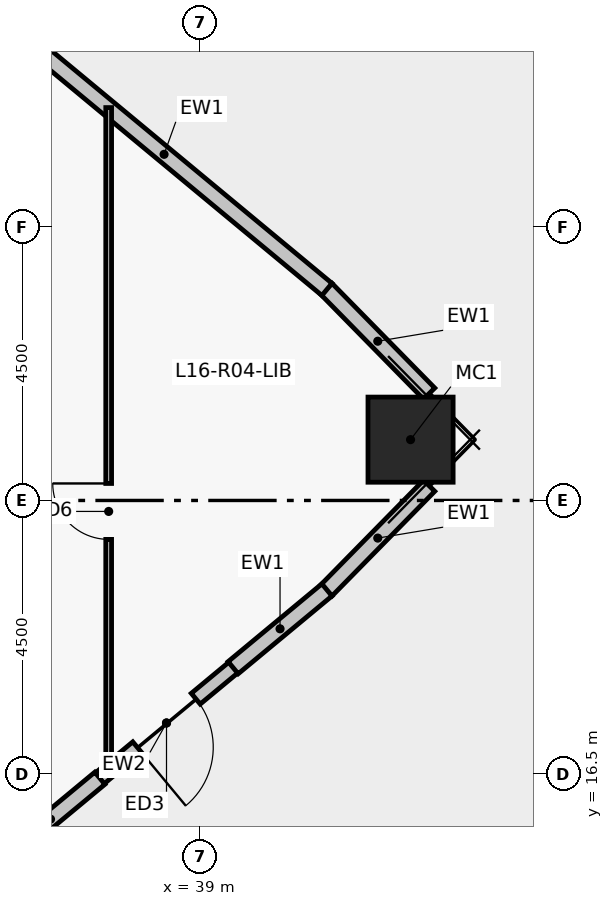
"""IFC4 building model, lengths in metres.
Left out: names, types, materials, properties, quantities, classifications, styles, units other than length and angle.
Written with IfcOpenShell. Run it as: python <this file> out.ifc"""

import sys

from ifc_helpers import new_model, si_unit, direction, frame, frame_2d, origin, origin_2d, place, context, subcontext, project, spatial, rectangle, hollow_rectangle, extrude, element, fill, save


model = new_model("IFC4")
c1 = context("Model", 3, precision=1e-05, world=origin(), true_north=direction((0.0, 1.0)))
c2 = subcontext(c1, "Body", "Model", "MODEL_VIEW")
j1 = project(units=[si_unit("LENGTHUNIT", "METRE"), si_unit("PLANEANGLEUNIT", "RADIAN")], contexts=[c1])
p1 = place(None, origin())
s1 = spatial("IfcSite", under=j1, at=p1, CompositionType="ELEMENT")
p2 = place(p1, origin())
s2 = spatial("IfcBuilding", under=s1, at=p2, CompositionType="ELEMENT")
p3 = place(p2, frame((0.0, 0.0, 68.52)))
s3 = spatial("IfcBuildingStorey", under=s2, at=p3, CompositionType="ELEMENT", Elevation=68.52)
p4 = place(p3, frame((42.465, 22.0, 0.0), z_axis=(0.0, 0.0, 1.0), x_axis=(1.0, 0.0, 0.0)))
e1 = element("IfcColumn", 1, at=p4, inside=s3, PredefinedType="COLUMN", context=c2, shape_type="SweptSolid", body=[
    extrude(hollow_rectangle(XDim=1.4, YDim=1.4, WallThickness=0.055, at=origin_2d()), origin(), (0.0, 0.0, 1.0), 3.72),
])
p5 = place(p3, frame((39.556, 18.258, 0.0), z_axis=(0.0, 0.0, 1.0), x_axis=(-0.769717209322, -0.6383850074, 0.0)))
e2 = element("IfcWall", 2, at=p5, inside=s3, PredefinedType="PARTITIONING", context=c2, shape_type="SweptSolid", body=[
    extrude(rectangle(XDim=2.872, YDim=0.23, at=frame_2d((1.436, 0.0))), origin(), (0.0, 0.0, 1.0), 3.47),
])
p6 = place(p5, frame((0.811, 0.0, 0.0)))
e3 = element("IfcOpeningElement", 3, at=p6, cuts=e2, PredefinedType="OPENING", context=c2, shape_type="SweptSolid", body=[
    extrude(rectangle(XDim=1.25, YDim=2.1, at=frame_2d((0.625, 1.05))), frame((0.0, 0.125, 0.0), z_axis=(0.0, -1.0, 0.0), x_axis=(1.0, 0.0, 0.0)), (0.0, 0.0, 1.0), 0.25),
])
for number, where, z_axis, x_axis in (
    (4, (42.77, 21.242, 0.0), (0.0, 0.0, 1.0), (-0.701, -0.714, 0.0)),
    (5, (41.081, 24.479, 0.0), (0.0, 0.0, 1.0), (0.701, -0.714, 0.0)),
):
    element("IfcWall", number, at=place(p3, frame(where, z_axis=z_axis, x_axis=x_axis)), inside=s3, PredefinedType="PARTITIONING", context=c2, shape_type="SweptSolid", body=[
        extrude(rectangle(XDim=2.412, YDim=0.26, at=frame_2d((1.206, 0.0))), origin(), (0.0, 0.0, 1.0), 3.47),
    ])
p7 = place(p3, frame((35.732, 28.914, 0.0), z_axis=(0.0, 0.0, 1.0), x_axis=(0.769754596928, -0.638339925517, 0.0)))
e6 = element("IfcWall", 6, at=p7, inside=s3, PredefinedType="PARTITIONING", context=c2, shape_type="SweptSolid", body=[
    extrude(rectangle(XDim=6.959, YDim=0.26, at=frame_2d((3.479, 0.0))), origin(), (0.0, 0.0, 1.0), 3.47),
])
p8 = place(p3, frame((37.355, 16.432, 0.0), z_axis=(0.0, 0.0, 1.0), x_axis=(-0.769776005505, -0.638314108687, 0.0)))
e7 = element("IfcWall", 7, at=p8, inside=s3, PredefinedType="PARTITIONING", context=c2, shape_type="SweptSolid", body=[
    extrude(rectangle(XDim=2.108, YDim=0.26, at=frame_2d((1.054, 0.0))), origin(), (0.0, 0.0, 1.0), 3.47),
])
p9 = place(p3, frame((41.089, 19.529, 0.0), z_axis=(0.0, 0.0, 1.0), x_axis=(-0.769727292958, -0.638372849106, 0.0)))
e8 = element("IfcWall", 8, at=p9, inside=s3, PredefinedType="PARTITIONING", context=c2, shape_type="SweptSolid", body=[
    extrude(rectangle(XDim=2.004, YDim=0.26, at=frame_2d((1.002, 0.0))), origin(), (0.0, 0.0, 1.0), 3.47),
])
p10 = place(p3, frame((37.5, 16.539, 0.0), z_axis=(0.0, 0.0, 1.0), x_axis=(0.0, 1.0, 0.0)))
e9 = element("IfcWall", 9, at=p10, inside=s3, PredefinedType="PARTITIONING", context=c2, shape_type="SweptSolid", body=[
    extrude(rectangle(XDim=10.922, YDim=0.095, at=frame_2d((5.461, 0.0))), origin(), (0.0, 0.0, 1.0), 2.2),
])
p11 = place(p10, frame((3.821, 0.0, 0.0)))
e10 = element("IfcOpeningElement", 10, at=p11, cuts=e9, PredefinedType="OPENING", context=c2, shape_type="SweptSolid", body=[
    extrude(rectangle(XDim=0.92, YDim=2.05, at=frame_2d((0.46, 1.025))), frame((0.0, 0.057, 0.0), z_axis=(0.0, -1.0, 0.0), x_axis=(1.0, 0.0, 0.0)), (0.0, 0.0, 1.0), 0.115),
])
p12 = place(p6, origin())
e11 = element("IfcDoor", 11, at=p12, inside=s3, OperationType="SINGLE_SWING_RIGHT", PredefinedType="DOOR", context=c2, shape_type="SweptSolid", body=[
    extrude(rectangle(XDim=1.25, YDim=2.1, at=frame_2d((0.625, 1.05))), frame((0.0, 0.025, 0.0), z_axis=(0.0, -1.0, 0.0), x_axis=(1.0, 0.0, 0.0)), (0.0, 0.0, 1.0), 0.05),
])
fill(e3, e11)
p13 = place(p11, origin())
e12 = element("IfcDoor", 12, at=p13, inside=s3, OperationType="SINGLE_SWING_RIGHT", PredefinedType="DOOR", context=c2, shape_type="SweptSolid", body=[
    extrude(rectangle(XDim=0.92, YDim=2.05, at=frame_2d((0.46, 1.025))), frame((0.0, 0.025, 0.0), z_axis=(0.0, -1.0, 0.0), x_axis=(1.0, 0.0, 0.0)), (0.0, 0.0, 1.0), 0.05),
])
fill(e10, e12)
save(model, sys.argv[1])
